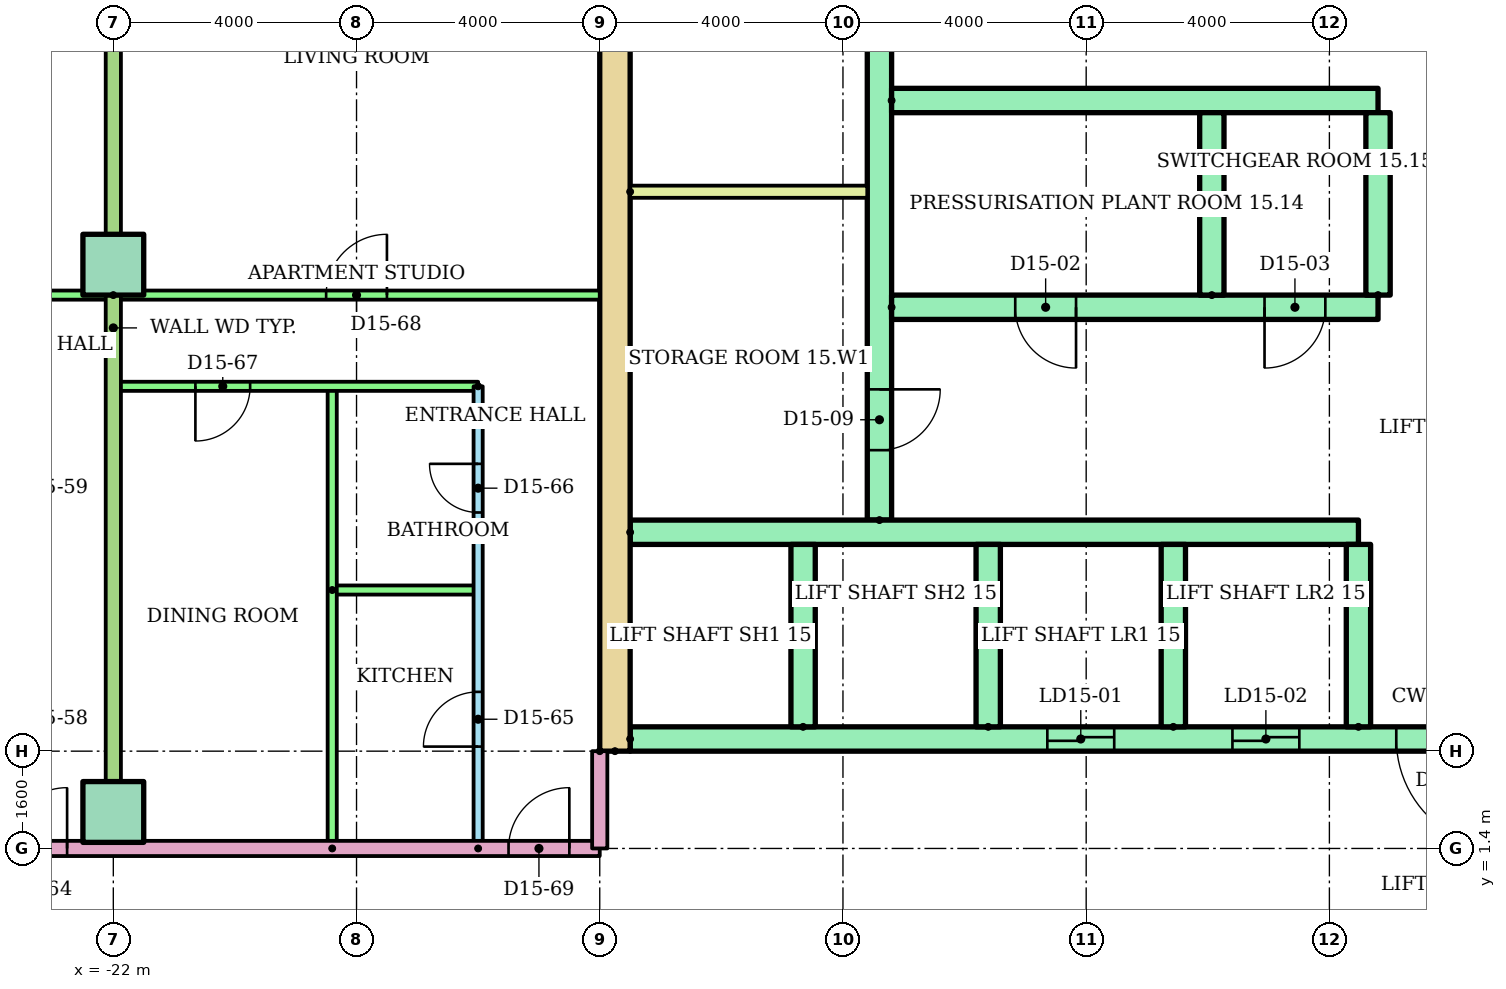
"""IFC4 building model, lengths in metres.
Left out: names, types, materials, properties, quantities, classifications, styles, units other than length and angle.
Written with IfcOpenShell. Run it as: python <this file> out.ifc"""

import sys

from ifc_helpers import new_model, si_unit, direction, frame, frame_2d, origin, origin_2d, place, context, subcontext, project, spatial, rectangle, extrude, element, fill, save


model = new_model("IFC4")
c1 = context("Model", 3, precision=1e-05, world=origin(), true_north=direction((0.0, 1.0)))
c2 = subcontext(c1, "Body", "Model", "MODEL_VIEW")
j1 = project(units=[si_unit("LENGTHUNIT", "METRE"), si_unit("PLANEANGLEUNIT", "RADIAN")], contexts=[c1])
p1 = place(None, origin())
s1 = spatial("IfcSite", under=j1, at=p1, CompositionType="ELEMENT")
p2 = place(p1, origin())
s2 = spatial("IfcBuilding", under=s1, at=p2, CompositionType="ELEMENT")
p3 = place(p2, frame((0.0, 0.0, 57.6)))
s3 = spatial("IfcBuildingStorey", under=s2, at=p3, CompositionType="ELEMENT", Elevation=57.6)
for number, where in (
    (1, (-22.0, 2.0, 0.0)),
    (2, (-22.0, 11.0, 0.0)),
):
    element("IfcColumn", number, at=place(p3, frame(where)), inside=s3, PredefinedType="COLUMN", context=c2, shape_type="SweptSolid", body=[
        extrude(rectangle(XDim=1.0, YDim=1.0, at=origin_2d()), origin(), (0.0, 0.0, 1.0), 3.2),
    ])
p4 = place(p3, frame((-13.75, 3.0, 0.0), z_axis=(0.0, 0.0, 1.0), x_axis=(0.0, 1.0, 0.0)))
e3 = element("IfcWall", 3, at=p4, inside=s3, PredefinedType="SHEAR", context=c2, shape_type="SweptSolid", body=[
    extrude(rectangle(XDim=17.0, YDim=0.5, at=frame_2d((8.5, 0.0))), origin(), (0.0, 0.0, 1.0), 2.92),
])
p5 = place(p3, frame((-9.4, 6.8, 0.0), z_axis=(0.0, 0.0, 1.0), x_axis=(0.0, 1.0, 0.0)))
e4 = element("IfcWall", 4, at=p5, inside=s3, PredefinedType="SHEAR", context=c2, shape_type="SweptSolid", body=[
    extrude(rectangle(XDim=12.7, YDim=0.4, at=frame_2d((6.35, 0.0))), origin(), (0.0, 0.0, 1.0), 2.92),
])
p6 = place(p5, frame((1.15, 0.0, 0.0)))
e5 = element("IfcOpeningElement", 5, at=p6, cuts=e4, PredefinedType="OPENING", context=c2, shape_type="SweptSolid", body=[
    extrude(rectangle(XDim=1.0, YDim=2.1, at=frame_2d((0.5, 1.05))), frame((0.0, 0.21, 0.0), z_axis=(0.0, -1.0, 0.0), x_axis=(1.0, 0.0, 0.0)), (0.0, 0.0, 1.0), 0.42),
])
p7 = place(p5, frame((7.925, 0.0, 0.0)))
e6 = element("IfcOpeningElement", 6, at=p7, cuts=e4, PredefinedType="OPENING", context=c2, shape_type="SweptSolid", body=[
    extrude(rectangle(XDim=1.0, YDim=2.1, at=frame_2d((0.5, 1.05))), frame((0.0, 0.21, 0.0), z_axis=(0.0, -1.0, 0.0), x_axis=(1.0, 0.0, 0.0)), (0.0, 0.0, 1.0), 0.42),
])
p8 = place(p3, frame((-13.5, 3.2, 0.0)))
e7 = element("IfcWall", 7, at=p8, inside=s3, PredefinedType="SHEAR", context=c2, shape_type="SweptSolid", body=[
    extrude(rectangle(XDim=27.0, YDim=0.4, at=frame_2d((13.5, 0.0))), origin(), (0.0, 0.0, 1.0), 2.92),
])
p9 = place(p8, frame((6.861, 0.0, 0.0)))
e8 = element("IfcOpeningElement", 8, at=p9, cuts=e7, PredefinedType="OPENING", context=c2, shape_type="SweptSolid", body=[
    extrude(rectangle(XDim=1.1, YDim=2.1, at=frame_2d((0.55, 1.05))), frame((0.0, 0.21, 0.0), z_axis=(0.0, -1.0, 0.0), x_axis=(1.0, 0.0, 0.0)), (0.0, 0.0, 1.0), 0.42),
])
p10 = place(p8, frame((9.906, 0.0, 0.0)))
e9 = element("IfcOpeningElement", 9, at=p10, cuts=e7, PredefinedType="OPENING", context=c2, shape_type="SweptSolid", body=[
    extrude(rectangle(XDim=1.1, YDim=2.1, at=frame_2d((0.55, 1.05))), frame((0.0, 0.21, 0.0), z_axis=(0.0, -1.0, 0.0), x_axis=(1.0, 0.0, 0.0)), (0.0, 0.0, 1.0), 0.42),
])
p11 = place(p8, frame((15.994, 0.0, 0.0)))
e10 = element("IfcOpeningElement", 10, at=p11, cuts=e7, PredefinedType="OPENING", context=c2, shape_type="SweptSolid", body=[
    extrude(rectangle(XDim=1.1, YDim=2.1, at=frame_2d((0.55, 1.05))), frame((0.0, 0.21, 0.0), z_axis=(0.0, -1.0, 0.0), x_axis=(1.0, 0.0, 0.0)), (0.0, 0.0, 1.0), 0.42),
])
p12 = place(p8, frame((19.039, 0.0, 0.0)))
e11 = element("IfcOpeningElement", 11, at=p12, cuts=e7, PredefinedType="OPENING", context=c2, shape_type="SweptSolid", body=[
    extrude(rectangle(XDim=1.1, YDim=2.1, at=frame_2d((0.55, 1.05))), frame((0.0, 0.21, 0.0), z_axis=(0.0, -1.0, 0.0), x_axis=(1.0, 0.0, 0.0)), (0.0, 0.0, 1.0), 0.42),
])
p13 = place(p8, frame((12.6, 0.0, 0.0)))
e12 = element("IfcOpeningElement", 12, at=p13, cuts=e7, PredefinedType="OPENING", context=c2, shape_type="SweptSolid", body=[
    extrude(rectangle(XDim=1.8, YDim=2.1, at=frame_2d((0.9, 1.05))), frame((0.0, 0.21, 0.0), z_axis=(0.0, -1.0, 0.0), x_axis=(1.0, 0.0, 0.0)), (0.0, 0.0, 1.0), 0.42),
])
p14 = place(p3, frame((-13.5, 6.6, 0.0)))
e13 = element("IfcWall", 13, at=p14, inside=s3, PredefinedType="SHEAR", context=c2, shape_type="SweptSolid", body=[
    extrude(rectangle(XDim=11.978, YDim=0.4, at=frame_2d((5.989, 0.0))), origin(), (0.0, 0.0, 1.0), 2.92),
])
for number, where, z_axis, x_axis in (
    (14, (-10.656, 3.4, 0.0), (0.0, 0.0, 1.0), (0.0, 1.0, 0.0)),
    (15, (-7.611, 3.4, 0.0), (0.0, 0.0, 1.0), (0.0, 1.0, 0.0)),
    (16, (-4.567, 3.4, 0.0), (0.0, 0.0, 1.0), (0.0, 1.0, 0.0)),
    (17, (-1.522, 3.4, 0.0), (0.0, 0.0, 1.0), (0.0, 1.0, 0.0)),
):
    element("IfcWall", number, at=place(p3, frame(where, z_axis=z_axis, x_axis=x_axis)), inside=s3, PredefinedType="SHEAR", context=c2, shape_type="SweptSolid", body=[
        extrude(rectangle(XDim=3.0, YDim=0.4, at=frame_2d((1.5, 0.0))), origin(), (0.0, 0.0, 1.0), 2.92),
    ])
p15 = place(p3, frame((-9.2, 10.3, 0.0)))
e18 = element("IfcWall", 18, at=p15, inside=s3, PredefinedType="SHEAR", context=c2, shape_type="SweptSolid", body=[
    extrude(rectangle(XDim=8.0, YDim=0.4, at=frame_2d((4.0, 0.0))), origin(), (0.0, 0.0, 1.0), 2.92),
])
p16 = place(p15, frame((2.033, 0.0, 0.0)))
e19 = element("IfcOpeningElement", 19, at=p16, cuts=e18, PredefinedType="OPENING", context=c2, shape_type="SweptSolid", body=[
    extrude(rectangle(XDim=1.0, YDim=2.1, at=frame_2d((0.5, 1.05))), frame((0.0, 0.21, 0.0), z_axis=(0.0, -1.0, 0.0), x_axis=(1.0, 0.0, 0.0)), (0.0, 0.0, 1.0), 0.42),
])
p17 = place(p15, frame((6.133, 0.0, 0.0)))
e20 = element("IfcOpeningElement", 20, at=p17, cuts=e18, PredefinedType="OPENING", context=c2, shape_type="SweptSolid", body=[
    extrude(rectangle(XDim=1.0, YDim=2.1, at=frame_2d((0.5, 1.05))), frame((0.0, 0.21, 0.0), z_axis=(0.0, -1.0, 0.0), x_axis=(1.0, 0.0, 0.0)), (0.0, 0.0, 1.0), 0.42),
])
p18 = place(p3, frame((-9.2, 13.7, 0.0)))
e21 = element("IfcWall", 21, at=p18, inside=s3, PredefinedType="SHEAR", context=c2, shape_type="SweptSolid", body=[
    extrude(rectangle(XDim=8.0, YDim=0.4, at=frame_2d((4.0, 0.0))), origin(), (0.0, 0.0, 1.0), 2.92),
])
for number, where, z_axis, x_axis in (
    (22, (-3.933, 10.5, 0.0), (0.0, 0.0, 1.0), (0.0, 1.0, 0.0)),
    (23, (-1.2, 10.5, 0.0), (0.0, 0.0, 1.0), (0.0, 1.0, 0.0)),
):
    element("IfcWall", number, at=place(p3, frame(where, z_axis=z_axis, x_axis=x_axis)), inside=s3, PredefinedType="SHEAR", context=c2, shape_type="SweptSolid", body=[
        extrude(rectangle(XDim=3.0, YDim=0.4, at=frame_2d((1.5, 0.0))), origin(), (0.0, 0.0, 1.0), 2.92),
    ])
p19 = place(p3, frame((-13.5, 12.2, 0.0)))
e24 = element("IfcWall", 24, at=p19, inside=s3, PredefinedType="PARTITIONING", context=c2, shape_type="SweptSolid", body=[
    extrude(rectangle(XDim=3.9, YDim=0.2, at=frame_2d((1.95, 0.0))), origin(), (0.0, 0.0, 1.0), 2.92),
])
p20 = place(p3, frame((-36.52, 10.5, 0.0)))
e25 = element("IfcWall", 25, at=p20, inside=s3, PredefinedType="PARTITIONING", context=c2, shape_type="SweptSolid", body=[
    extrude(rectangle(XDim=14.52, YDim=0.15, at=frame_2d((7.26, 0.0))), origin(), (0.0, 0.0, 1.0), 2.4),
])
p21 = place(p20, frame((1.97, 0.0, 0.0)))
e26 = element("IfcOpeningElement", 26, at=p21, cuts=e25, PredefinedType="OPENING", context=c2, shape_type="SweptSolid", body=[
    extrude(rectangle(XDim=1.0, YDim=2.1, at=frame_2d((0.5, 1.05))), frame((0.0, 0.085, 0.0), z_axis=(0.0, -1.0, 0.0), x_axis=(1.0, 0.0, 0.0)), (0.0, 0.0, 1.0), 0.17),
])
p22 = place(p20, frame((9.12, 0.0, 0.0)))
e27 = element("IfcOpeningElement", 27, at=p22, cuts=e25, PredefinedType="OPENING", context=c2, shape_type="SweptSolid", body=[
    extrude(rectangle(XDim=1.0, YDim=2.1, at=frame_2d((0.5, 1.05))), frame((0.0, 0.085, 0.0), z_axis=(0.0, -1.0, 0.0), x_axis=(1.0, 0.0, 0.0)), (0.0, 0.0, 1.0), 0.17),
])
p23 = place(p3, frame((-16.0, 1.4, 0.0), z_axis=(0.0, 0.0, 1.0), x_axis=(0.0, 1.0, 0.0)))
e28 = element("IfcWall", 28, at=p23, inside=s3, PredefinedType="PARTITIONING", context=c2, shape_type="SweptSolid", body=[
    extrude(rectangle(XDim=7.6, YDim=0.15, at=frame_2d((3.8, 0.0))), origin(), (0.0, 0.0, 1.0), 2.4),
])
p24 = place(p23, frame((1.675, 0.0, 0.0)))
e29 = element("IfcOpeningElement", 29, at=p24, cuts=e28, PredefinedType="OPENING", context=c2, shape_type="SweptSolid", body=[
    extrude(rectangle(XDim=0.9, YDim=2.1, at=frame_2d((0.45, 1.05))), frame((0.0, 0.085, 0.0), z_axis=(0.0, -1.0, 0.0), x_axis=(1.0, 0.0, 0.0)), (0.0, 0.0, 1.0), 0.17),
])
p25 = place(p23, frame((5.525, 0.0, 0.0)))
e30 = element("IfcOpeningElement", 30, at=p25, cuts=e28, PredefinedType="OPENING", context=c2, shape_type="SweptSolid", body=[
    extrude(rectangle(XDim=0.8, YDim=2.1, at=frame_2d((0.4, 1.05))), frame((0.0, 0.085, 0.0), z_axis=(0.0, -1.0, 0.0), x_axis=(1.0, 0.0, 0.0)), (0.0, 0.0, 1.0), 0.17),
])
p26 = place(p3, frame((-18.4, 5.65, 0.0)))
e31 = element("IfcWall", 31, at=p26, inside=s3, PredefinedType="PARTITIONING", context=c2, shape_type="SweptSolid", body=[
    extrude(rectangle(XDim=2.4, YDim=0.15, at=frame_2d((1.2, 0.0))), origin(), (0.0, 0.0, 1.0), 2.4),
])
p27 = place(p3, frame((-18.4, 1.4, 0.0), z_axis=(0.0, 0.0, 1.0), x_axis=(0.0, 1.0, 0.0)))
e32 = element("IfcWall", 32, at=p27, inside=s3, PredefinedType="PARTITIONING", context=c2, shape_type="SweptSolid", body=[
    extrude(rectangle(XDim=7.6, YDim=0.15, at=frame_2d((3.8, 0.0))), origin(), (0.0, 0.0, 1.0), 2.4),
])
p28 = place(p3, frame((-16.0, 9.0, 0.0), z_axis=(0.0, 0.0, 1.0), x_axis=(-1.0, 0.0, 0.0)))
e33 = element("IfcWall", 33, at=p28, inside=s3, PredefinedType="PARTITIONING", context=c2, shape_type="SweptSolid", body=[
    extrude(rectangle(XDim=6.0, YDim=0.15, at=frame_2d((3.0, 0.0))), origin(), (0.0, 0.0, 1.0), 2.4),
])
p29 = place(p28, frame((3.75, 0.0, 0.0)))
e34 = element("IfcOpeningElement", 34, at=p29, cuts=e33, PredefinedType="OPENING", context=c2, shape_type="SweptSolid", body=[
    extrude(rectangle(XDim=0.9, YDim=2.1, at=frame_2d((0.45, 1.05))), frame((0.0, 0.085, 0.0), z_axis=(0.0, -1.0, 0.0), x_axis=(1.0, 0.0, 0.0)), (0.0, 0.0, 1.0), 0.17),
])
p30 = place(p3, frame((-22.0, 10.5, 0.0)))
e35 = element("IfcWall", 35, at=p30, inside=s3, PredefinedType="PARTITIONING", context=c2, shape_type="SweptSolid", body=[
    extrude(rectangle(XDim=8.0, YDim=0.15, at=frame_2d((4.0, 0.0))), origin(), (0.0, 0.0, 1.0), 2.4),
])
p31 = place(p30, frame((3.5, 0.0, 0.0)))
e36 = element("IfcOpeningElement", 36, at=p31, cuts=e35, PredefinedType="OPENING", context=c2, shape_type="SweptSolid", body=[
    extrude(rectangle(XDim=1.0, YDim=2.1, at=frame_2d((0.5, 1.05))), frame((0.0, 0.085, 0.0), z_axis=(0.0, -1.0, 0.0), x_axis=(1.0, 0.0, 0.0)), (0.0, 0.0, 1.0), 0.17),
])
p32 = place(p3, frame((-22.0, 18.521, 0.0), z_axis=(0.0, 0.0, 1.0), x_axis=(0.0, -1.0, 0.0)))
e37 = element("IfcWall", 37, at=p32, inside=s3, PredefinedType="PARTITIONING", context=c2, shape_type="SweptSolid", body=[
    extrude(rectangle(XDim=17.121, YDim=0.25, at=frame_2d((8.561, 0.0))), origin(), (0.0, 0.0, 1.0), 2.4),
])
p33 = place(p3, frame((-29.0, 1.4, 0.0)))
e38 = element("IfcWall", 38, at=p33, inside=s3, PredefinedType="PARTITIONING", context=c2, shape_type="SweptSolid", body=[
    extrude(rectangle(XDim=15.0, YDim=0.25, at=frame_2d((7.5, 0.0))), origin(), (0.0, 0.0, 1.0), 2.4),
])
p34 = place(p33, frame((5.24, 0.0, 0.0)))
e39 = element("IfcOpeningElement", 39, at=p34, cuts=e38, PredefinedType="OPENING", context=c2, shape_type="SweptSolid", body=[
    extrude(rectangle(XDim=1.0, YDim=2.1, at=frame_2d((0.5, 1.05))), frame((0.0, 0.135, 0.0), z_axis=(0.0, -1.0, 0.0), x_axis=(1.0, 0.0, 0.0)), (0.0, 0.0, 1.0), 0.27),
])
p35 = place(p33, frame((13.5, 0.0, 0.0)))
e40 = element("IfcOpeningElement", 40, at=p35, cuts=e38, PredefinedType="OPENING", context=c2, shape_type="SweptSolid", body=[
    extrude(rectangle(XDim=1.0, YDim=2.1, at=frame_2d((0.5, 1.05))), frame((0.0, 0.135, 0.0), z_axis=(0.0, -1.0, 0.0), x_axis=(1.0, 0.0, 0.0)), (0.0, 0.0, 1.0), 0.27),
])
p36 = place(p3, frame((-14.0, 3.0, 0.0), z_axis=(0.0, 0.0, 1.0), x_axis=(0.0, -1.0, 0.0)))
e41 = element("IfcWall", 41, at=p36, inside=s3, PredefinedType="PARTITIONING", context=c2, shape_type="SweptSolid", body=[
    extrude(rectangle(XDim=1.6, YDim=0.25, at=frame_2d((0.8, 0.0))), origin(), (0.0, 0.0, 1.0), 2.4),
])
p37 = place(p9, origin())
e42 = element("IfcDoor", 42, at=p37, inside=s3, OperationType="SLIDING_TO_LEFT", PredefinedType="DOOR", context=c2, shape_type="SweptSolid", body=[
    extrude(rectangle(XDim=1.1, YDim=2.1, at=frame_2d((0.55, 1.05))), frame((0.0, 0.025, 0.0), z_axis=(0.0, -1.0, 0.0), x_axis=(1.0, 0.0, 0.0)), (0.0, 0.0, 1.0), 0.05),
])
fill(e8, e42)
p38 = place(p10, origin())
e43 = element("IfcDoor", 43, at=p38, inside=s3, OperationType="SLIDING_TO_LEFT", PredefinedType="DOOR", context=c2, shape_type="SweptSolid", body=[
    extrude(rectangle(XDim=1.1, YDim=2.1, at=frame_2d((0.55, 1.05))), frame((0.0, 0.025, 0.0), z_axis=(0.0, -1.0, 0.0), x_axis=(1.0, 0.0, 0.0)), (0.0, 0.0, 1.0), 0.05),
])
fill(e9, e43)
p39 = place(p13, frame((1.8, 0.0, 0.0), z_axis=(0.0, 0.0, 1.0), x_axis=(-1.0, 0.0, 0.0)))
e44 = element("IfcDoor", 44, at=p39, inside=s3, OperationType="DOUBLE_DOOR_SINGLE_SWING", PredefinedType="DOOR", context=c2, shape_type="SweptSolid", body=[
    extrude(rectangle(XDim=1.8, YDim=2.1, at=frame_2d((0.9, 1.05))), frame((0.0, 0.025, 0.0), z_axis=(0.0, -1.0, 0.0), x_axis=(1.0, 0.0, 0.0)), (0.0, 0.0, 1.0), 0.05),
])
fill(e12, e44)
p40 = place(p16, frame((1.0, 0.0, 0.0), z_axis=(0.0, 0.0, 1.0), x_axis=(-1.0, 0.0, 0.0)))
e45 = element("IfcDoor", 45, at=p40, inside=s3, OperationType="SINGLE_SWING_RIGHT", PredefinedType="DOOR", context=c2, shape_type="SweptSolid", body=[
    extrude(rectangle(XDim=1.0, YDim=2.1, at=frame_2d((0.5, 1.05))), frame((0.0, 0.025, 0.0), z_axis=(0.0, -1.0, 0.0), x_axis=(1.0, 0.0, 0.0)), (0.0, 0.0, 1.0), 0.05),
])
fill(e19, e45)
p41 = place(p17, frame((1.0, 0.0, 0.0), z_axis=(0.0, 0.0, 1.0), x_axis=(-1.0, 0.0, 0.0)))
e46 = element("IfcDoor", 46, at=p41, inside=s3, OperationType="SINGLE_SWING_LEFT", PredefinedType="DOOR", context=c2, shape_type="SweptSolid", body=[
    extrude(rectangle(XDim=1.0, YDim=2.1, at=frame_2d((0.5, 1.05))), frame((0.0, 0.025, 0.0), z_axis=(0.0, -1.0, 0.0), x_axis=(1.0, 0.0, 0.0)), (0.0, 0.0, 1.0), 0.05),
])
fill(e20, e46)
p42 = place(p6, frame((1.0, 0.0, 0.0), z_axis=(0.0, 0.0, 1.0), x_axis=(-1.0, 0.0, 0.0)))
e47 = element("IfcDoor", 47, at=p42, inside=s3, OperationType="SINGLE_SWING_RIGHT", PredefinedType="DOOR", context=c2, shape_type="SweptSolid", body=[
    extrude(rectangle(XDim=1.0, YDim=2.1, at=frame_2d((0.5, 1.05))), frame((0.0, 0.025, 0.0), z_axis=(0.0, -1.0, 0.0), x_axis=(1.0, 0.0, 0.0)), (0.0, 0.0, 1.0), 0.05),
])
fill(e5, e47)
p43 = place(p34, origin())
e48 = element("IfcDoor", 48, at=p43, inside=s3, OperationType="SINGLE_SWING_RIGHT", PredefinedType="DOOR", context=c2, shape_type="SweptSolid", body=[
    extrude(rectangle(XDim=1.0, YDim=2.1, at=frame_2d((0.5, 1.05))), frame((0.0, 0.025, 0.0), z_axis=(0.0, -1.0, 0.0), x_axis=(1.0, 0.0, 0.0)), (0.0, 0.0, 1.0), 0.05),
])
fill(e39, e48)
p44 = place(p24, origin())
e49 = element("IfcDoor", 49, at=p44, inside=s3, OperationType="SINGLE_SWING_LEFT", PredefinedType="DOOR", context=c2, shape_type="SweptSolid", body=[
    extrude(rectangle(XDim=0.9, YDim=2.1, at=frame_2d((0.45, 1.05))), frame((0.0, 0.025, 0.0), z_axis=(0.0, -1.0, 0.0), x_axis=(1.0, 0.0, 0.0)), (0.0, 0.0, 1.0), 0.05),
])
fill(e29, e49)
p45 = place(p25, origin())
e50 = element("IfcDoor", 50, at=p45, inside=s3, OperationType="SINGLE_SWING_RIGHT", PredefinedType="DOOR", context=c2, shape_type="SweptSolid", body=[
    extrude(rectangle(XDim=0.8, YDim=2.1, at=frame_2d((0.4, 1.05))), frame((0.0, 0.025, 0.0), z_axis=(0.0, -1.0, 0.0), x_axis=(1.0, 0.0, 0.0)), (0.0, 0.0, 1.0), 0.05),
])
fill(e30, e50)
p46 = place(p29, origin())
e51 = element("IfcDoor", 51, at=p46, inside=s3, OperationType="SINGLE_SWING_RIGHT", PredefinedType="DOOR", context=c2, shape_type="SweptSolid", body=[
    extrude(rectangle(XDim=0.9, YDim=2.1, at=frame_2d((0.45, 1.05))), frame((0.0, 0.025, 0.0), z_axis=(0.0, -1.0, 0.0), x_axis=(1.0, 0.0, 0.0)), (0.0, 0.0, 1.0), 0.05),
])
fill(e34, e51)
p47 = place(p31, origin())
e52 = element("IfcDoor", 52, at=p47, inside=s3, OperationType="SINGLE_SWING_RIGHT", PredefinedType="DOOR", context=c2, shape_type="SweptSolid", body=[
    extrude(rectangle(XDim=1.0, YDim=2.1, at=frame_2d((0.5, 1.05))), frame((0.0, 0.025, 0.0), z_axis=(0.0, -1.0, 0.0), x_axis=(1.0, 0.0, 0.0)), (0.0, 0.0, 1.0), 0.05),
])
fill(e36, e52)
p48 = place(p35, origin())
e53 = element("IfcDoor", 53, at=p48, inside=s3, OperationType="SINGLE_SWING_RIGHT", PredefinedType="DOOR", context=c2, shape_type="SweptSolid", body=[
    extrude(rectangle(XDim=1.0, YDim=2.1, at=frame_2d((0.5, 1.05))), frame((0.0, 0.025, 0.0), z_axis=(0.0, -1.0, 0.0), x_axis=(1.0, 0.0, 0.0)), (0.0, 0.0, 1.0), 0.05),
])
fill(e40, e53)
save(model, sys.argv[1])
